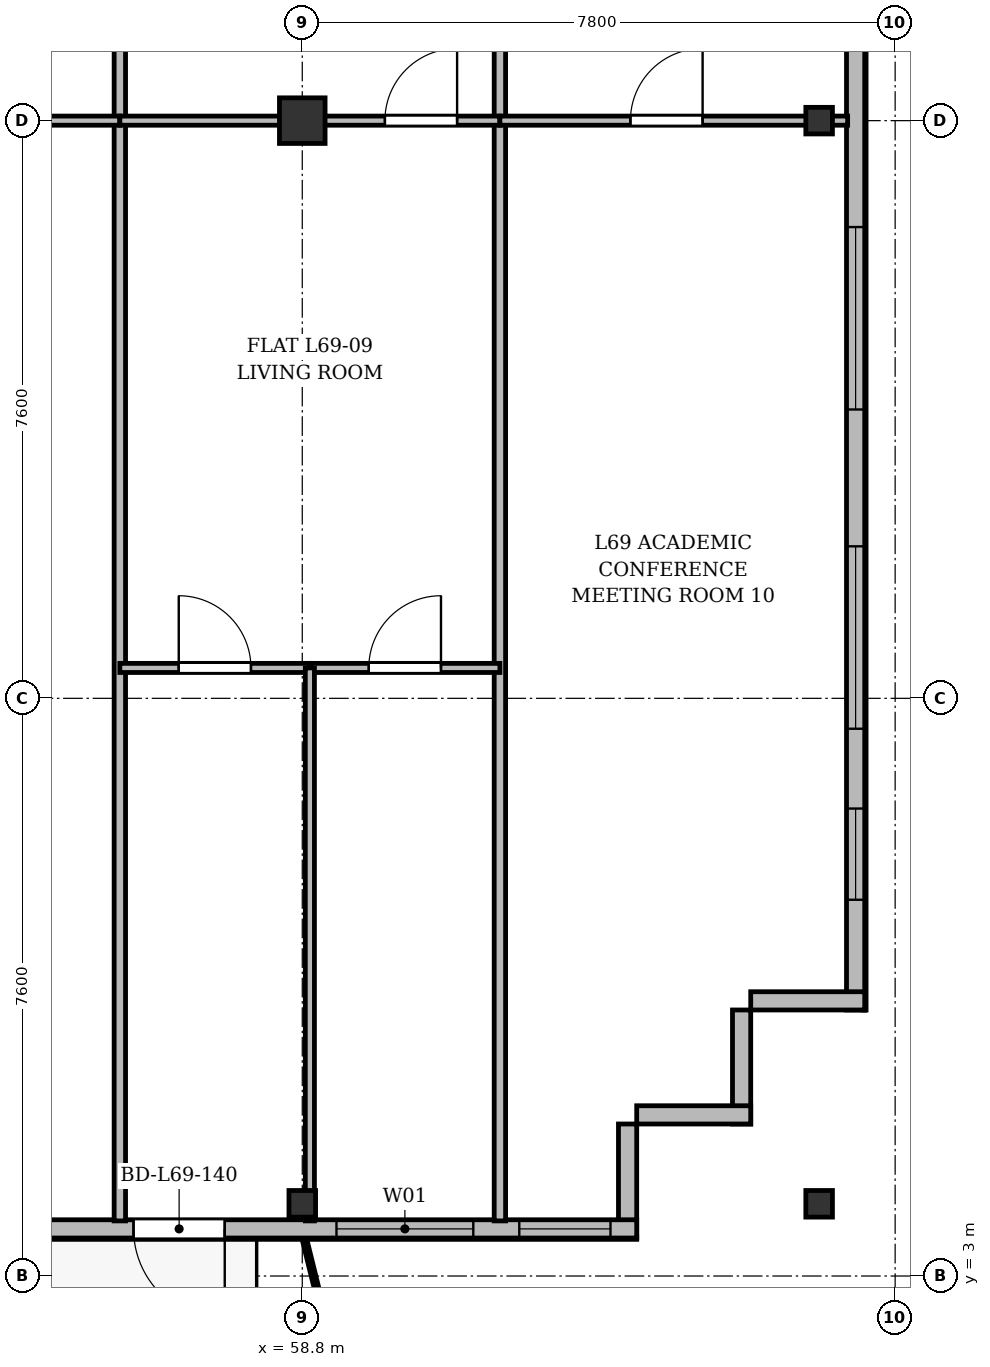
"""IFC4 building model, lengths in metres.
Left out: names, types, materials, properties, quantities, classifications, styles, units other than length and angle.
Written with IfcOpenShell. Run it as: python <this file> out.ifc"""

import sys

from ifc_helpers import new_model, si_unit, direction, frame, frame_2d, origin, origin_2d, place, context, subcontext, project, spatial, rectangle, i_section, extrude, source, transform, mapped, element, fill, save


model = new_model("IFC4")
c1 = context("Model", 3, precision=1e-05, world=origin(), true_north=direction((0.0, 1.0)))
c2 = subcontext(c1, "Body", "Model", "MODEL_VIEW")
j1 = project(units=[si_unit("LENGTHUNIT", "METRE"), si_unit("PLANEANGLEUNIT", "RADIAN")], contexts=[c1])
p1 = place(None, origin())
s1 = spatial("IfcSite", under=j1, at=p1, CompositionType="ELEMENT")
p2 = place(p1, origin())
s2 = spatial("IfcBuilding", under=s1, at=p2, CompositionType="ELEMENT")
p3 = place(p2, frame((0.0, 0.0, 266.7)))
s3 = spatial("IfcBuildingStorey", under=s2, at=p3, CompositionType="ELEMENT", Elevation=266.7)
m1 = source(origin(), c2, "Body", "SweptSolid", [
    extrude(i_section(OverallWidth=0.35, OverallDepth=0.35, WebThickness=0.018, FlangeThickness=0.028, at=origin_2d()), origin(), (0.0, 0.0, 1.0), 3.6),
])
p4 = place(p3, frame((58.8, 3.95, 0.0), z_axis=(0.0, 0.0, 1.0), x_axis=(1.0, 0.0, 0.0)))
e1 = element("IfcColumn", 1, at=p4, inside=s3, PredefinedType="COLUMN", context=c2, shape_type="MappedRepresentation", body=[
    mapped(m1, transform((0.0, 0.0, 0.0), x_axis=(1.0, 0.0, 0.0), y_axis=(0.0, 1.0, 0.0), z_axis=(0.0, 0.0, 1.0), scale=1.0)),
])
m2 = source(origin(), c2, "Body", "SweptSolid", [
    extrude(rectangle(XDim=0.6, YDim=0.6, at=origin_2d()), origin(), (0.0, 0.0, 1.0), 3.6),
])
p5 = place(p3, frame((58.8, 18.2, 0.0), z_axis=(0.0, 0.0, 1.0), x_axis=(1.0, 0.0, 0.0)))
e2 = element("IfcColumn", 2, at=p5, inside=s3, PredefinedType="COLUMN", context=c2, shape_type="MappedRepresentation", body=[
    mapped(m2, transform((0.0, 0.0, 0.0), x_axis=(1.0, 0.0, 0.0), y_axis=(0.0, 1.0, 0.0), z_axis=(0.0, 0.0, 1.0), scale=1.0)),
])
for number, where, z_axis, x_axis in (
    (3, (65.6, 3.95, 0.0), (0.0, 0.0, 1.0), (1.0, 0.0, 0.0)),
    (4, (65.6, 18.2, 0.0), (0.0, 0.0, 1.0), (1.0, 0.0, 0.0)),
):
    element("IfcColumn", number, at=place(p3, frame(where, z_axis=z_axis, x_axis=x_axis)), inside=s3, PredefinedType="COLUMN", context=c2, shape_type="MappedRepresentation", body=[
        mapped(m1, transform((0.0, 0.0, 0.0), x_axis=(1.0, 0.0, 0.0), y_axis=(0.0, 1.0, 0.0), z_axis=(0.0, 0.0, 1.0), scale=1.0)),
    ])
p6 = place(p3, frame((66.08, 45.5, 0.0), z_axis=(0.0, 0.0, 1.0), x_axis=(0.0, -1.0, 0.0)))
e5 = element("IfcWall", 5, at=p6, inside=s3, PredefinedType="SOLIDWALL", context=c2, shape_type="SweptSolid", body=[
    extrude(rectangle(XDim=39.0, YDim=0.24, at=frame_2d((19.5, 0.0))), origin(), (0.0, 0.0, 1.0), 3.37),
])
p7 = place(p6, frame((36.35, 0.0, 0.92)))
e6 = element("IfcOpeningElement", 6, at=p7, cuts=e5, PredefinedType="OPENING", context=c2, shape_type="SweptSolid", body=[
    extrude(rectangle(XDim=1.2, YDim=1.65, at=frame_2d((0.6, 0.825))), frame((0.0, 0.13, 0.0), z_axis=(0.0, -1.0, 0.0), x_axis=(1.0, 0.0, 0.0)), (0.0, 0.0, 1.0), 0.26),
])
p8 = place(p6, frame((32.9, 0.0, 0.92)))
e7 = element("IfcOpeningElement", 7, at=p8, cuts=e5, PredefinedType="OPENING", context=c2, shape_type="SweptSolid", body=[
    extrude(rectangle(XDim=2.4, YDim=2.1, at=frame_2d((1.2, 1.05))), frame((0.0, 0.13, 0.0), z_axis=(0.0, -1.0, 0.0), x_axis=(1.0, 0.0, 0.0)), (0.0, 0.0, 1.0), 0.26),
])
p9 = place(p6, frame((28.7, 0.0, 0.92)))
e8 = element("IfcOpeningElement", 8, at=p9, cuts=e5, PredefinedType="OPENING", context=c2, shape_type="SweptSolid", body=[
    extrude(rectangle(XDim=2.4, YDim=2.1, at=frame_2d((1.2, 1.05))), frame((0.0, 0.13, 0.0), z_axis=(0.0, -1.0, 0.0), x_axis=(1.0, 0.0, 0.0)), (0.0, 0.0, 1.0), 0.26),
])
p10 = place(p6, frame((21.5, 0.0, 0.92)))
e9 = element("IfcOpeningElement", 9, at=p10, cuts=e5, PredefinedType="OPENING", context=c2, shape_type="SweptSolid", body=[
    extrude(rectangle(XDim=2.4, YDim=2.1, at=frame_2d((1.2, 1.05))), frame((0.0, 0.13, 0.0), z_axis=(0.0, -1.0, 0.0), x_axis=(1.0, 0.0, 0.0)), (0.0, 0.0, 1.0), 0.26),
])
p11 = place(p6, frame((7.5, 0.0, 0.92)))
e10 = element("IfcOpeningElement", 10, at=p11, cuts=e5, PredefinedType="OPENING", context=c2, shape_type="SweptSolid", body=[
    extrude(rectangle(XDim=2.4, YDim=2.1, at=frame_2d((1.2, 1.05))), frame((0.0, 0.13, 0.0), z_axis=(0.0, -1.0, 0.0), x_axis=(1.0, 0.0, 0.0)), (0.0, 0.0, 1.0), 0.26),
])
p12 = place(p6, frame((4.5, 0.0, 0.92)))
e11 = element("IfcOpeningElement", 11, at=p12, cuts=e5, PredefinedType="OPENING", context=c2, shape_type="SweptSolid", body=[
    extrude(rectangle(XDim=1.2, YDim=1.65, at=frame_2d((0.6, 0.825))), frame((0.0, 0.13, 0.0), z_axis=(0.0, -1.0, 0.0), x_axis=(1.0, 0.0, 0.0)), (0.0, 0.0, 1.0), 0.26),
])
p13 = place(p6, frame((1.15, 0.0, 0.92)))
e12 = element("IfcOpeningElement", 12, at=p13, cuts=e5, PredefinedType="OPENING", context=c2, shape_type="SweptSolid", body=[
    extrude(rectangle(XDim=1.2, YDim=1.65, at=frame_2d((0.6, 0.825))), frame((0.0, 0.13, 0.0), z_axis=(0.0, -1.0, 0.0), x_axis=(1.0, 0.0, 0.0)), (0.0, 0.0, 1.0), 0.26),
])
p14 = place(p3, frame((66.2, 6.62, 0.0), z_axis=(0.0, 0.0, 1.0), x_axis=(-1.0, 0.0, 0.0)))
e13 = element("IfcWall", 13, at=p14, inside=s3, PredefinedType="SOLIDWALL", context=c2, shape_type="SweptSolid", body=[
    extrude(rectangle(XDim=1.5, YDim=0.24, at=frame_2d((0.75, 0.0))), origin(), (0.0, 0.0, 1.0), 2.87),
])
for number, where, z_axis, x_axis in (
    (14, (64.58, 6.5, 0.0), (0.0, 0.0, 1.0), (0.0, -1.0, 0.0)),
    (15, (64.7, 5.12, 0.0), (0.0, 0.0, 1.0), (-1.0, 0.0, 0.0)),
):
    element("IfcWall", number, at=place(p3, frame(where, z_axis=z_axis, x_axis=x_axis)), inside=s3, PredefinedType="SOLIDWALL", context=c2, shape_type="SweptSolid", body=[
        extrude(rectangle(XDim=1.5, YDim=0.24, at=frame_2d((0.75, 0.0))), origin(), (0.0, 0.0, 1.0), 3.37),
    ])
p15 = place(p3, frame((63.08, 5.0, 0.0), z_axis=(0.0, 0.0, 1.0), x_axis=(0.0, -1.0, 0.0)))
e16 = element("IfcWall", 16, at=p15, inside=s3, PredefinedType="SOLIDWALL", context=c2, shape_type="SweptSolid", body=[
    extrude(rectangle(XDim=1.5, YDim=0.24, at=frame_2d((0.75, 0.0))), origin(), (0.0, 0.0, 1.0), 2.92),
])
p16 = place(p3, frame((63.2, 3.62, 0.0), z_axis=(0.0, 0.0, 1.0), x_axis=(-1.0, 0.0, 0.0)))
e17 = element("IfcWall", 17, at=p16, inside=s3, PredefinedType="SOLIDWALL", context=c2, shape_type="SweptSolid", body=[
    extrude(rectangle(XDim=52.0, YDim=0.24, at=frame_2d((26.0, 0.0))), origin(), (0.0, 0.0, 1.0), 3.37),
])
p17 = place(p16, frame((0.345, 0.0, 0.9)))
e18 = element("IfcOpeningElement", 18, at=p17, cuts=e17, PredefinedType="OPENING", context=c2, shape_type="SweptSolid", body=[
    extrude(rectangle(XDim=1.2, YDim=1.65, at=frame_2d((0.6, 0.825))), frame((0.0, 0.13, 0.0), z_axis=(0.0, -1.0, 0.0), x_axis=(1.0, 0.0, 0.0)), (0.0, 0.0, 1.0), 0.26),
])
p18 = place(p16, frame((2.15, 0.0, 0.9)))
e19 = element("IfcOpeningElement", 19, at=p18, cuts=e17, PredefinedType="OPENING", context=c2, shape_type="SweptSolid", body=[
    extrude(rectangle(XDim=1.8, YDim=1.8, at=frame_2d((0.9, 0.9))), frame((0.0, 0.13, 0.0), z_axis=(0.0, -1.0, 0.0), x_axis=(1.0, 0.0, 0.0)), (0.0, 0.0, 1.0), 0.26),
])
p19 = place(p16, frame((5.42, 0.0, 0.0)))
e20 = element("IfcOpeningElement", 20, at=p19, cuts=e17, PredefinedType="OPENING", context=c2, shape_type="SweptSolid", body=[
    extrude(rectangle(XDim=1.2, YDim=2.2, at=frame_2d((0.6, 1.1))), frame((0.0, 0.13, 0.0), z_axis=(0.0, -1.0, 0.0), x_axis=(1.0, 0.0, 0.0)), (0.0, 0.0, 1.0), 0.26),
])
p20 = place(p16, frame((8.75, 0.0, 0.9)))
e21 = element("IfcOpeningElement", 21, at=p20, cuts=e17, PredefinedType="OPENING", context=c2, shape_type="SweptSolid", body=[
    extrude(rectangle(XDim=1.5, YDim=1.75, at=frame_2d((0.75, 0.875))), frame((0.0, 0.13, 0.0), z_axis=(0.0, -1.0, 0.0), x_axis=(1.0, 0.0, 0.0)), (0.0, 0.0, 1.0), 0.26),
])
p21 = place(p16, frame((14.8, 0.0, 0.9)))
e22 = element("IfcOpeningElement", 22, at=p21, cuts=e17, PredefinedType="OPENING", context=c2, shape_type="SweptSolid", body=[
    extrude(rectangle(XDim=2.0, YDim=1.95, at=frame_2d((1.0, 0.975))), frame((0.0, 0.13, 0.0), z_axis=(0.0, -1.0, 0.0), x_axis=(1.0, 0.0, 0.0)), (0.0, 0.0, 1.0), 0.26),
])
p22 = place(p16, frame((20.425, 0.0, 0.9)))
e23 = element("IfcOpeningElement", 23, at=p22, cuts=e17, PredefinedType="OPENING", context=c2, shape_type="SweptSolid", body=[
    extrude(rectangle(XDim=1.65, YDim=1.85, at=frame_2d((0.825, 0.925))), frame((0.0, 0.13, 0.0), z_axis=(0.0, -1.0, 0.0), x_axis=(1.0, 0.0, 0.0)), (0.0, 0.0, 1.0), 0.26),
])
p23 = place(p16, frame((24.05, 0.0, 0.9)))
e24 = element("IfcOpeningElement", 24, at=p23, cuts=e17, PredefinedType="OPENING", context=c2, shape_type="SweptSolid", body=[
    extrude(rectangle(XDim=1.8, YDim=1.8, at=frame_2d((0.9, 0.9))), frame((0.0, 0.13, 0.0), z_axis=(0.0, -1.0, 0.0), x_axis=(1.0, 0.0, 0.0)), (0.0, 0.0, 1.0), 0.26),
])
p24 = place(p16, frame((28.6, 0.0, 0.9)))
e25 = element("IfcOpeningElement", 25, at=p24, cuts=e17, PredefinedType="OPENING", context=c2, shape_type="SweptSolid", body=[
    extrude(rectangle(XDim=2.2, YDim=1.8, at=frame_2d((1.1, 0.9))), frame((0.0, 0.13, 0.0), z_axis=(0.0, -1.0, 0.0), x_axis=(1.0, 0.0, 0.0)), (0.0, 0.0, 1.0), 0.26),
])
p25 = place(p16, frame((34.078, 0.0, 0.0)))
e26 = element("IfcOpeningElement", 26, at=p25, cuts=e17, PredefinedType="OPENING", context=c2, shape_type="SweptSolid", body=[
    extrude(rectangle(XDim=1.2, YDim=2.2, at=frame_2d((0.6, 1.1))), frame((0.0, 0.13, 0.0), z_axis=(0.0, -1.0, 0.0), x_axis=(1.0, 0.0, 0.0)), (0.0, 0.0, 1.0), 0.26),
])
p26 = place(p16, frame((37.0, 0.0, 0.9)))
e27 = element("IfcOpeningElement", 27, at=p26, cuts=e17, PredefinedType="OPENING", context=c2, shape_type="SweptSolid", body=[
    extrude(rectangle(XDim=2.0, YDim=1.95, at=frame_2d((1.0, 0.975))), frame((0.0, 0.13, 0.0), z_axis=(0.0, -1.0, 0.0), x_axis=(1.0, 0.0, 0.0)), (0.0, 0.0, 1.0), 0.26),
])
p27 = place(p16, frame((41.075, 0.0, 0.9)))
e28 = element("IfcOpeningElement", 28, at=p27, cuts=e17, PredefinedType="OPENING", context=c2, shape_type="SweptSolid", body=[
    extrude(rectangle(XDim=1.65, YDim=1.85, at=frame_2d((0.825, 0.925))), frame((0.0, 0.13, 0.0), z_axis=(0.0, -1.0, 0.0), x_axis=(1.0, 0.0, 0.0)), (0.0, 0.0, 1.0), 0.26),
])
p28 = place(p16, frame((44.19, 0.0, 0.9)))
e29 = element("IfcOpeningElement", 29, at=p28, cuts=e17, PredefinedType="OPENING", context=c2, shape_type="SweptSolid", body=[
    extrude(rectangle(XDim=1.8, YDim=1.8, at=frame_2d((0.9, 0.9))), frame((0.0, 0.13, 0.0), z_axis=(0.0, -1.0, 0.0), x_axis=(1.0, 0.0, 0.0)), (0.0, 0.0, 1.0), 0.26),
])
p29 = place(p16, frame((50.005, 0.0, 0.9)))
e30 = element("IfcOpeningElement", 30, at=p29, cuts=e17, PredefinedType="OPENING", context=c2, shape_type="SweptSolid", body=[
    extrude(rectangle(XDim=1.5, YDim=1.75, at=frame_2d((0.75, 0.875))), frame((0.0, 0.13, 0.0), z_axis=(0.0, -1.0, 0.0), x_axis=(1.0, 0.0, 0.0)), (0.0, 0.0, 1.0), 0.26),
])
for number, where, z_axis, x_axis in (
    (31, (56.4, 3.725, 0.0), (0.0, 0.0, 1.0), (0.0, 1.0, 0.0)),
    (32, (61.4, 3.725, 0.0), (0.0, 0.0, 1.0), (0.0, 1.0, 0.0)),
):
    element("IfcWall", number, at=place(p3, frame(where, z_axis=z_axis, x_axis=x_axis)), inside=s3, PredefinedType="PARTITIONING", context=c2, shape_type="SweptSolid", body=[
        extrude(rectangle(XDim=27.275, YDim=0.15, at=frame_2d((13.637, 0.0))), origin(), (0.0, 0.0, 1.0), 2.92),
    ])
p30 = place(p3, frame((51.0, 18.2, 0.0), z_axis=(0.0, 0.0, 1.0), x_axis=(1.0, 0.0, 0.0)))
e33 = element("IfcWall", 33, at=p30, inside=s3, PredefinedType="PARTITIONING", context=c2, shape_type="SweptSolid", body=[
    extrude(rectangle(XDim=5.4, YDim=0.12, at=frame_2d((2.7, 0.0))), origin(), (0.0, 0.0, 1.0), 2.92),
])
p31 = place(p30, frame((2.225, 0.0, 0.0)))
e34 = element("IfcOpeningElement", 34, at=p31, cuts=e33, PredefinedType="OPENING", context=c2, shape_type="SweptSolid", body=[
    extrude(rectangle(XDim=0.95, YDim=2.15, at=frame_2d((0.475, 1.075))), frame((0.0, 0.07, 0.0), z_axis=(0.0, -1.0, 0.0), x_axis=(1.0, 0.0, 0.0)), (0.0, 0.0, 1.0), 0.14),
])
p32 = place(p3, frame((56.4, 18.2, 0.0), z_axis=(0.0, 0.0, 1.0), x_axis=(1.0, 0.0, 0.0)))
e35 = element("IfcWall", 35, at=p32, inside=s3, PredefinedType="PARTITIONING", context=c2, shape_type="SweptSolid", body=[
    extrude(rectangle(XDim=5.0, YDim=0.12, at=frame_2d((2.5, 0.0))), origin(), (0.0, 0.0, 1.0), 2.92),
])
p33 = place(p32, frame((3.487, 0.0, 0.0)))
e36 = element("IfcOpeningElement", 36, at=p33, cuts=e35, PredefinedType="OPENING", context=c2, shape_type="SweptSolid", body=[
    extrude(rectangle(XDim=0.95, YDim=2.15, at=frame_2d((0.475, 1.075))), frame((0.0, 0.07, 0.0), z_axis=(0.0, -1.0, 0.0), x_axis=(1.0, 0.0, 0.0)), (0.0, 0.0, 1.0), 0.14),
])
p34 = place(p3, frame((56.4, 11.0, 0.0), z_axis=(0.0, 0.0, 1.0), x_axis=(1.0, 0.0, 0.0)))
e37 = element("IfcWall", 37, at=p34, inside=s3, PredefinedType="PARTITIONING", context=c2, shape_type="SweptSolid", body=[
    extrude(rectangle(XDim=2.5, YDim=0.12, at=frame_2d((1.25, 0.0))), origin(), (0.0, 0.0, 1.0), 2.87),
])
p35 = place(p34, frame((0.775, 0.0, 0.0)))
e38 = element("IfcOpeningElement", 38, at=p35, cuts=e37, PredefinedType="OPENING", context=c2, shape_type="SweptSolid", body=[
    extrude(rectangle(XDim=0.95, YDim=2.15, at=frame_2d((0.475, 1.075))), frame((0.0, 0.07, 0.0), z_axis=(0.0, -1.0, 0.0), x_axis=(1.0, 0.0, 0.0)), (0.0, 0.0, 1.0), 0.14),
])
p36 = place(p3, frame((58.9, 11.0, 0.0), z_axis=(0.0, 0.0, 1.0), x_axis=(1.0, 0.0, 0.0)))
e39 = element("IfcWall", 39, at=p36, inside=s3, PredefinedType="PARTITIONING", context=c2, shape_type="SweptSolid", body=[
    extrude(rectangle(XDim=2.5, YDim=0.12, at=frame_2d((1.25, 0.0))), origin(), (0.0, 0.0, 1.0), 3.37),
])
p37 = place(p36, frame((0.775, 0.0, 0.0)))
e40 = element("IfcOpeningElement", 40, at=p37, cuts=e39, PredefinedType="OPENING", context=c2, shape_type="SweptSolid", body=[
    extrude(rectangle(XDim=0.95, YDim=2.15, at=frame_2d((0.475, 1.075))), frame((0.0, 0.07, 0.0), z_axis=(0.0, -1.0, 0.0), x_axis=(1.0, 0.0, 0.0)), (0.0, 0.0, 1.0), 0.14),
])
p38 = place(p3, frame((58.9, 3.725, 0.0), z_axis=(0.0, 0.0, 1.0), x_axis=(0.0, 1.0, 0.0)))
e41 = element("IfcWall", 41, at=p38, inside=s3, PredefinedType="PARTITIONING", context=c2, shape_type="SweptSolid", body=[
    extrude(rectangle(XDim=7.275, YDim=0.12, at=frame_2d((3.637, 0.0))), origin(), (0.0, 0.0, 1.0), 2.87),
])
p39 = place(p3, frame((61.4, 18.2, 0.0), z_axis=(0.0, 0.0, 1.0), x_axis=(1.0, 0.0, 0.0)))
e42 = element("IfcWall", 42, at=p39, inside=s3, PredefinedType="PARTITIONING", context=c2, shape_type="SweptSolid", body=[
    extrude(rectangle(XDim=4.575, YDim=0.12, at=frame_2d((2.288, 0.0))), origin(), (0.0, 0.0, 1.0), 2.92),
])
p40 = place(p39, frame((1.717, 0.0, 0.0)))
e43 = element("IfcOpeningElement", 43, at=p40, cuts=e42, PredefinedType="OPENING", context=c2, shape_type="SweptSolid", body=[
    extrude(rectangle(XDim=0.95, YDim=2.15, at=frame_2d((0.475, 1.075))), frame((0.0, 0.07, 0.0), z_axis=(0.0, -1.0, 0.0), x_axis=(1.0, 0.0, 0.0)), (0.0, 0.0, 1.0), 0.14),
])
m3 = source(origin(), c2, "Body", "SweptSolid", [
    extrude(rectangle(XDim=1.2, YDim=1.65, at=frame_2d((0.6, 0.825))), frame((0.0, 0.03, 0.0), z_axis=(0.0, -1.0, 0.0), x_axis=(1.0, 0.0, 0.0)), (0.0, 0.0, 1.0), 0.06),
])
p41 = place(p7, origin())
e44 = element("IfcWindow", 44, at=p41, inside=s3, PartitioningType="SINGLE_PANEL", PredefinedType="WINDOW", context=c2, shape_type="MappedRepresentation", body=[
    mapped(m3, transform((0.0, 0.0, 0.0), x_axis=(1.0, 0.0, 0.0), y_axis=(0.0, 1.0, 0.0), z_axis=(0.0, 0.0, 1.0), scale=1.0)),
])
fill(e6, e44)
m4 = source(origin(), c2, "Body", "SweptSolid", [
    extrude(rectangle(XDim=2.4, YDim=2.1, at=frame_2d((1.2, 1.05))), frame((0.0, 0.03, 0.0), z_axis=(0.0, -1.0, 0.0), x_axis=(1.0, 0.0, 0.0)), (0.0, 0.0, 1.0), 0.06),
])
p42 = place(p8, origin())
e45 = element("IfcWindow", 45, at=p42, inside=s3, PartitioningType="SINGLE_PANEL", PredefinedType="WINDOW", context=c2, shape_type="MappedRepresentation", body=[
    mapped(m4, transform((0.0, 0.0, 0.0), x_axis=(1.0, 0.0, 0.0), y_axis=(0.0, 1.0, 0.0), z_axis=(0.0, 0.0, 1.0), scale=1.0)),
])
fill(e7, e45)
p43 = place(p9, origin())
e46 = element("IfcWindow", 46, at=p43, inside=s3, PartitioningType="SINGLE_PANEL", PredefinedType="WINDOW", context=c2, shape_type="MappedRepresentation", body=[
    mapped(m4, transform((0.0, 0.0, 0.0), x_axis=(1.0, 0.0, 0.0), y_axis=(0.0, 1.0, 0.0), z_axis=(0.0, 0.0, 1.0), scale=1.0)),
])
fill(e8, e46)
p44 = place(p17, origin())
e47 = element("IfcWindow", 47, at=p44, inside=s3, PartitioningType="SINGLE_PANEL", PredefinedType="WINDOW", context=c2, shape_type="MappedRepresentation", body=[
    mapped(m3, transform((0.0, 0.0, 0.0), x_axis=(1.0, 0.0, 0.0), y_axis=(0.0, 1.0, 0.0), z_axis=(0.0, 0.0, 1.0), scale=1.0)),
])
fill(e18, e47)
m5 = source(origin(), c2, "Body", "SweptSolid", [
    extrude(rectangle(XDim=1.8, YDim=1.8, at=frame_2d((0.9, 0.9))), frame((0.0, 0.03, 0.0), z_axis=(0.0, -1.0, 0.0), x_axis=(1.0, 0.0, 0.0)), (0.0, 0.0, 1.0), 0.06),
])
p45 = place(p18, origin())
e48 = element("IfcWindow", 48, at=p45, inside=s3, PartitioningType="SINGLE_PANEL", PredefinedType="WINDOW", context=c2, shape_type="MappedRepresentation", body=[
    mapped(m5, transform((0.0, 0.0, 0.0), x_axis=(1.0, 0.0, 0.0), y_axis=(0.0, 1.0, 0.0), z_axis=(0.0, 0.0, 1.0), scale=1.0)),
])
fill(e19, e48)
m6 = source(origin(), c2, "Body", "SweptSolid", [
    extrude(rectangle(XDim=1.2, YDim=2.2, at=frame_2d((0.6, 1.1))), frame((0.0, 0.025, 0.0), z_axis=(0.0, -1.0, 0.0), x_axis=(1.0, 0.0, 0.0)), (0.0, 0.0, 1.0), 0.05),
])
p46 = place(p19, origin())
e49 = element("IfcDoor", 49, at=p46, inside=s3, OperationType="SINGLE_SWING_LEFT", PredefinedType="DOOR", context=c2, shape_type="MappedRepresentation", body=[
    mapped(m6, transform((0.0, 0.0, 0.0), x_axis=(1.0, 0.0, 0.0), y_axis=(0.0, 1.0, 0.0), z_axis=(0.0, 0.0, 1.0), scale=1.0)),
])
fill(e20, e49)
m7 = source(origin(), c2, "Body", "SweptSolid", [
    extrude(rectangle(XDim=0.95, YDim=2.15, at=frame_2d((0.475, 1.075))), frame((0.0, 0.025, 0.0), z_axis=(0.0, -1.0, 0.0), x_axis=(1.0, 0.0, 0.0)), (0.0, 0.0, 1.0), 0.05),
])
p47 = place(p33, origin())
e50 = element("IfcDoor", 50, at=p47, inside=s3, OperationType="SINGLE_SWING_RIGHT", PredefinedType="DOOR", context=c2, shape_type="MappedRepresentation", body=[
    mapped(m7, transform((0.0, 0.0, 0.0), x_axis=(1.0, 0.0, 0.0), y_axis=(0.0, 1.0, 0.0), z_axis=(0.0, 0.0, 1.0), scale=1.0)),
])
fill(e36, e50)
p48 = place(p35, origin())
e51 = element("IfcDoor", 51, at=p48, inside=s3, OperationType="SINGLE_SWING_LEFT", PredefinedType="DOOR", context=c2, shape_type="MappedRepresentation", body=[
    mapped(m7, transform((0.0, 0.0, 0.0), x_axis=(1.0, 0.0, 0.0), y_axis=(0.0, 1.0, 0.0), z_axis=(0.0, 0.0, 1.0), scale=1.0)),
])
fill(e38, e51)
p49 = place(p37, origin())
e52 = element("IfcDoor", 52, at=p49, inside=s3, OperationType="SINGLE_SWING_RIGHT", PredefinedType="DOOR", context=c2, shape_type="MappedRepresentation", body=[
    mapped(m7, transform((0.0, 0.0, 0.0), x_axis=(1.0, 0.0, 0.0), y_axis=(0.0, 1.0, 0.0), z_axis=(0.0, 0.0, 1.0), scale=1.0)),
])
fill(e40, e52)
p50 = place(p40, origin())
e53 = element("IfcDoor", 53, at=p50, inside=s3, OperationType="SINGLE_SWING_RIGHT", PredefinedType="DOOR", context=c2, shape_type="MappedRepresentation", body=[
    mapped(m7, transform((0.0, 0.0, 0.0), x_axis=(1.0, 0.0, 0.0), y_axis=(0.0, 1.0, 0.0), z_axis=(0.0, 0.0, 1.0), scale=1.0)),
])
fill(e43, e53)
save(model, sys.argv[1])
